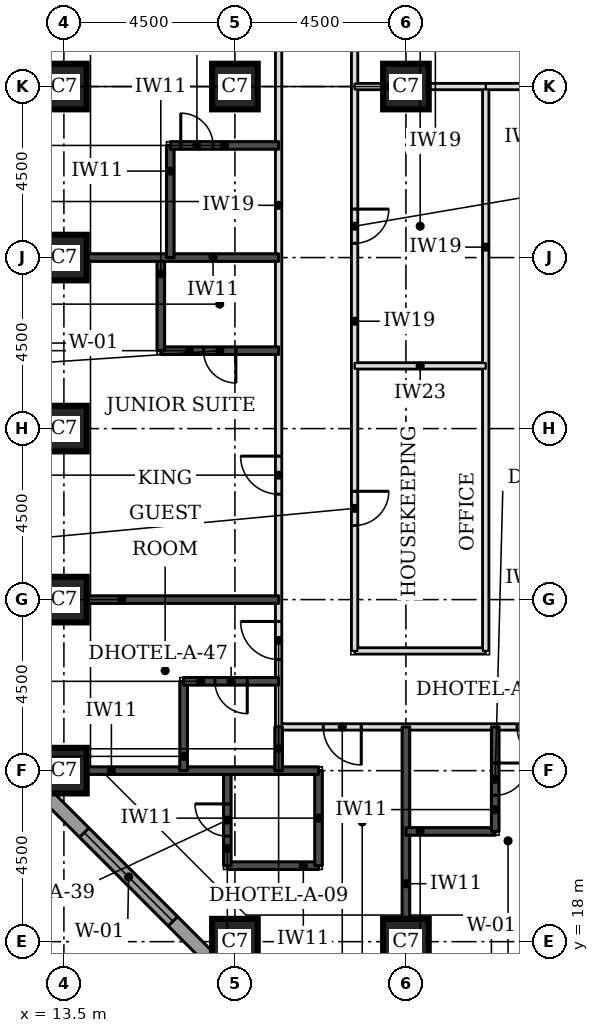
"""IFC4 building model, lengths in metres.
Left out: names, types, materials, properties, quantities, classifications, styles, units other than length and angle.
Written with IfcOpenShell. Run it as: python <this file> out.ifc"""

import sys

from ifc_helpers import new_model, si_unit, direction, frame, frame_2d, origin, origin_2d, place, context, subcontext, project, spatial, rectangle, extrude, element, fill, save


model = new_model("IFC4")
c1 = context("Model", 3, precision=1e-05, world=origin(), true_north=direction((0.0, 1.0)))
c2 = subcontext(c1, "Body", "Model", "MODEL_VIEW")
j1 = project(units=[si_unit("LENGTHUNIT", "METRE"), si_unit("PLANEANGLEUNIT", "RADIAN")], contexts=[c1])
p1 = place(None, origin())
s1 = spatial("IfcSite", under=j1, at=p1, CompositionType="ELEMENT")
p2 = place(p1, origin())
s2 = spatial("IfcBuilding", under=s1, at=p2, CompositionType="ELEMENT")
p3 = place(p2, frame((0.0, 0.0, 26.4)))
s3 = spatial("IfcBuildingStorey", under=s2, at=p3, CompositionType="ELEMENT", Elevation=26.4)
for number, where, z_axis, x_axis in (
    (1, (18.0, 18.0, 0.0), (0.0, 0.0, 1.0), (1.0, 0.0, 0.0)),
    (2, (22.5, 18.0, 0.0), (0.0, 0.0, 1.0), (1.0, 0.0, 0.0)),
    (3, (13.5, 22.5, 0.0), (0.0, 0.0, 1.0), (1.0, 0.0, 0.0)),
    (4, (13.5, 27.0, 0.0), (0.0, 0.0, 1.0), (1.0, 0.0, 0.0)),
    (5, (13.5, 31.5, 0.0), (0.0, 0.0, 1.0), (1.0, 0.0, 0.0)),
    (6, (13.5, 36.0, 0.0), (0.0, 0.0, 1.0), (1.0, 0.0, 0.0)),
    (7, (13.5, 40.5, 0.0), (0.0, 0.0, 1.0), (1.0, 0.0, 0.0)),
    (8, (18.0, 40.5, 0.0), (0.0, 0.0, 1.0), (1.0, 0.0, 0.0)),
    (9, (22.5, 40.5, 0.0), (0.0, 0.0, 1.0), (1.0, 0.0, 0.0)),
):
    element("IfcColumn", number, at=place(p3, frame(where, z_axis=z_axis, x_axis=x_axis)), inside=s3, PredefinedType="COLUMN", context=c2, shape_type="SweptSolid", body=[
        extrude(rectangle(XDim=1.2, YDim=1.2, at=origin_2d()), origin(), (0.0, 0.0, 1.0), 3.3),
    ])
p4 = place(p3, frame((12.674, 22.23, 0.0), z_axis=(0.0, 0.0, 1.0), x_axis=(0.707106781187, -0.707106781187, 0.0)))
e10 = element("IfcWall", 10, at=p4, inside=s3, PredefinedType="STANDARD", context=c2, shape_type="SweptSolid", body=[
    extrude(rectangle(XDim=7.151, YDim=0.35, at=frame_2d((3.576, 0.0))), origin(), (0.0, 0.0, 1.0), 3.055),
])
p5 = place(p4, frame((1.926, 0.0, 0.8)))
e11 = element("IfcOpeningElement", 11, at=p5, cuts=e10, PredefinedType="OPENING", context=c2, shape_type="SweptSolid", body=[
    extrude(rectangle(XDim=3.3, YDim=1.5, at=frame_2d((1.65, 0.75))), frame((0.0, 0.185, 0.0), z_axis=(0.0, -1.0, 0.0), x_axis=(1.0, 0.0, 0.0)), (0.0, 0.0, 1.0), 0.37),
])
p6 = place(p3, frame((19.15, 23.65, 0.0), z_axis=(0.0, 0.0, 1.0), x_axis=(1.0, 0.0, 0.0)))
e12 = element("IfcWall", 12, at=p6, inside=s3, PredefinedType="PARTITIONING", context=c2, shape_type="SweptSolid", body=[
    extrude(rectangle(XDim=32.35, YDim=0.15, at=frame_2d((16.175, 0.0))), origin(), (0.0, 0.0, 1.0), 3.08),
])
p7 = place(p6, frame((6.275, 0.0, 0.0)))
e13 = element("IfcOpeningElement", 13, at=p7, cuts=e12, PredefinedType="OPENING", context=c2, shape_type="SweptSolid", body=[
    extrude(rectangle(XDim=1.0, YDim=2.1, at=frame_2d((0.5, 1.05))), frame((0.0, 0.085, 0.0), z_axis=(0.0, -1.0, 0.0), x_axis=(1.0, 0.0, 0.0)), (0.0, 0.0, 1.0), 0.17),
])
p8 = place(p6, frame((8.675, 0.0, 0.0)))
e14 = element("IfcOpeningElement", 14, at=p8, cuts=e12, PredefinedType="OPENING", context=c2, shape_type="SweptSolid", body=[
    extrude(rectangle(XDim=1.0, YDim=2.1, at=frame_2d((0.5, 1.05))), frame((0.0, 0.085, 0.0), z_axis=(0.0, -1.0, 0.0), x_axis=(1.0, 0.0, 0.0)), (0.0, 0.0, 1.0), 0.17),
])
p9 = place(p6, frame((15.25, 0.0, 0.0)))
e15 = element("IfcOpeningElement", 15, at=p9, cuts=e12, PredefinedType="OPENING", context=c2, shape_type="SweptSolid", body=[
    extrude(rectangle(XDim=1.0, YDim=2.1, at=frame_2d((0.5, 1.05))), frame((0.0, 0.085, 0.0), z_axis=(0.0, -1.0, 0.0), x_axis=(1.0, 0.0, 0.0)), (0.0, 0.0, 1.0), 0.17),
])
p10 = place(p6, frame((17.675, 0.0, 0.0)))
e16 = element("IfcOpeningElement", 16, at=p10, cuts=e12, PredefinedType="OPENING", context=c2, shape_type="SweptSolid", body=[
    extrude(rectangle(XDim=1.0, YDim=2.1, at=frame_2d((0.5, 1.05))), frame((0.0, 0.085, 0.0), z_axis=(0.0, -1.0, 0.0), x_axis=(1.0, 0.0, 0.0)), (0.0, 0.0, 1.0), 0.17),
])
p11 = place(p6, frame((24.275, 0.0, 0.0)))
e17 = element("IfcOpeningElement", 17, at=p11, cuts=e12, PredefinedType="OPENING", context=c2, shape_type="SweptSolid", body=[
    extrude(rectangle(XDim=1.0, YDim=2.1, at=frame_2d((0.5, 1.05))), frame((0.0, 0.085, 0.0), z_axis=(0.0, -1.0, 0.0), x_axis=(1.0, 0.0, 0.0)), (0.0, 0.0, 1.0), 0.17),
])
p12 = place(p6, frame((26.675, 0.0, 0.0)))
e18 = element("IfcOpeningElement", 18, at=p12, cuts=e12, PredefinedType="OPENING", context=c2, shape_type="SweptSolid", body=[
    extrude(rectangle(XDim=1.0, YDim=2.1, at=frame_2d((0.5, 1.05))), frame((0.0, 0.085, 0.0), z_axis=(0.0, -1.0, 0.0), x_axis=(1.0, 0.0, 0.0)), (0.0, 0.0, 1.0), 0.17),
])
p13 = place(p6, frame((1.175, 0.0, 0.0)))
e19 = element("IfcOpeningElement", 19, at=p13, cuts=e12, PredefinedType="OPENING", context=c2, shape_type="SweptSolid", body=[
    extrude(rectangle(XDim=1.0, YDim=2.1, at=frame_2d((0.5, 1.05))), frame((0.0, 0.085, 0.0), z_axis=(0.0, -1.0, 0.0), x_axis=(1.0, 0.0, 0.0)), (0.0, 0.0, 1.0), 0.17),
])
p14 = place(p6, frame((30.85, 0.0, 0.0)))
e20 = element("IfcOpeningElement", 20, at=p14, cuts=e12, PredefinedType="OPENING", context=c2, shape_type="SweptSolid", body=[
    extrude(rectangle(XDim=1.0, YDim=2.1, at=frame_2d((0.5, 1.05))), frame((0.0, 0.085, 0.0), z_axis=(0.0, -1.0, 0.0), x_axis=(1.0, 0.0, 0.0)), (0.0, 0.0, 1.0), 0.17),
])
p15 = place(p3, frame((19.15, 23.65, 0.0), z_axis=(0.0, 0.0, 1.0), x_axis=(0.0, 1.0, 0.0)))
e21 = element("IfcWall", 21, at=p15, inside=s3, PredefinedType="PARTITIONING", context=c2, shape_type="SweptSolid", body=[
    extrude(rectangle(XDim=25.85, YDim=0.15, at=frame_2d((12.925, 0.0))), origin(), (0.0, 0.0, 1.0), 3.08),
])
p16 = place(p15, frame((1.775, 0.0, 0.0)))
e22 = element("IfcOpeningElement", 22, at=p16, cuts=e21, PredefinedType="OPENING", context=c2, shape_type="SweptSolid", body=[
    extrude(rectangle(XDim=1.0, YDim=2.1, at=frame_2d((0.5, 1.05))), frame((0.0, 0.085, 0.0), z_axis=(0.0, -1.0, 0.0), x_axis=(1.0, 0.0, 0.0)), (0.0, 0.0, 1.0), 0.17),
])
p17 = place(p15, frame((6.125, 0.0, 0.0)))
e23 = element("IfcOpeningElement", 23, at=p17, cuts=e21, PredefinedType="OPENING", context=c2, shape_type="SweptSolid", body=[
    extrude(rectangle(XDim=1.0, YDim=2.1, at=frame_2d((0.5, 1.05))), frame((0.0, 0.085, 0.0), z_axis=(0.0, -1.0, 0.0), x_axis=(1.0, 0.0, 0.0)), (0.0, 0.0, 1.0), 0.17),
])
p18 = place(p15, frame((17.825, 0.0, 0.0)))
e24 = element("IfcOpeningElement", 24, at=p18, cuts=e21, PredefinedType="OPENING", context=c2, shape_type="SweptSolid", body=[
    extrude(rectangle(XDim=1.0, YDim=2.1, at=frame_2d((0.5, 1.05))), frame((0.0, 0.085, 0.0), z_axis=(0.0, -1.0, 0.0), x_axis=(1.0, 0.0, 0.0)), (0.0, 0.0, 1.0), 0.17),
])
p19 = place(p15, frame((23.04, 0.0, 0.0)))
e25 = element("IfcOpeningElement", 25, at=p19, cuts=e21, PredefinedType="OPENING", context=c2, shape_type="SweptSolid", body=[
    extrude(rectangle(XDim=0.9, YDim=2.1, at=frame_2d((0.45, 1.05))), frame((0.0, 0.085, 0.0), z_axis=(0.0, -1.0, 0.0), x_axis=(1.0, 0.0, 0.0)), (0.0, 0.0, 1.0), 0.17),
])
p20 = place(p3, frame((21.15, 25.65, 0.0), z_axis=(0.0, 0.0, 1.0), x_axis=(1.0, 0.0, 0.0)))
e26 = element("IfcWall", 26, at=p20, inside=s3, PredefinedType="PARTITIONING", context=c2, shape_type="SweptSolid", body=[
    extrude(rectangle(XDim=3.45, YDim=0.15, at=frame_2d((1.725, 0.0))), origin(), (0.0, 0.0, 1.0), 3.08),
])
p21 = place(p3, frame((21.15, 25.65, 0.0), z_axis=(0.0, 0.0, 1.0), x_axis=(0.0, 1.0, 0.0)))
e27 = element("IfcWall", 27, at=p21, inside=s3, PredefinedType="PARTITIONING", context=c2, shape_type="SweptSolid", body=[
    extrude(rectangle(XDim=17.35, YDim=0.15, at=frame_2d((8.675, 0.0))), origin(), (0.0, 0.0, 1.0), 3.08),
])
p22 = place(p21, frame((3.3, 0.0, 0.0)))
e28 = element("IfcOpeningElement", 28, at=p22, cuts=e27, PredefinedType="OPENING", context=c2, shape_type="SweptSolid", body=[
    extrude(rectangle(XDim=0.9, YDim=2.1, at=frame_2d((0.45, 1.05))), frame((0.0, 0.085, 0.0), z_axis=(0.0, -1.0, 0.0), x_axis=(1.0, 0.0, 0.0)), (0.0, 0.0, 1.0), 0.17),
])
p23 = place(p21, frame((10.725, 0.0, 0.0)))
e29 = element("IfcOpeningElement", 29, at=p23, cuts=e27, PredefinedType="OPENING", context=c2, shape_type="SweptSolid", body=[
    extrude(rectangle(XDim=0.9, YDim=2.1, at=frame_2d((0.45, 1.05))), frame((0.0, 0.085, 0.0), z_axis=(0.0, -1.0, 0.0), x_axis=(1.0, 0.0, 0.0)), (0.0, 0.0, 1.0), 0.17),
])
p24 = place(p3, frame((24.6, 25.65, 0.0), z_axis=(0.0, 0.0, 1.0), x_axis=(0.0, 1.0, 0.0)))
e30 = element("IfcWall", 30, at=p24, inside=s3, PredefinedType="PARTITIONING", context=c2, shape_type="SweptSolid", body=[
    extrude(rectangle(XDim=14.85, YDim=0.15, at=frame_2d((7.425, 0.0))), origin(), (0.0, 0.0, 1.0), 3.08),
])
p25 = place(p3, frame((24.6, 40.5, 0.0), z_axis=(0.0, 0.0, 1.0), x_axis=(1.0, 0.0, 0.0)))
e31 = element("IfcWall", 31, at=p25, inside=s3, PredefinedType="PARTITIONING", context=c2, shape_type="SweptSolid", body=[
    extrude(rectangle(XDim=2.35, YDim=0.15, at=frame_2d((1.175, 0.0))), origin(), (0.0, 0.0, 1.0), 2.33),
])
p26 = place(p3, frame((22.5, 18.6, 0.0), z_axis=(0.0, 0.0, 1.0), x_axis=(0.0, 1.0, 0.0)))
e32 = element("IfcWall", 32, at=p26, inside=s3, PredefinedType="SOLIDWALL", context=c2, shape_type="SweptSolid", body=[
    extrude(rectangle(XDim=5.05, YDim=0.2, at=frame_2d((2.525, 0.0))), origin(), (0.0, 0.0, 1.0), 3.08),
])
p27 = place(p3, frame((17.8, 20.0, 0.0), z_axis=(0.0, 0.0, 1.0), x_axis=(1.0, 0.0, 0.0)))
e33 = element("IfcWall", 33, at=p27, inside=s3, PredefinedType="SOLIDWALL", context=c2, shape_type="SweptSolid", body=[
    extrude(rectangle(XDim=2.4, YDim=0.2, at=frame_2d((1.2, 0.0))), origin(), (0.0, 0.0, 1.0), 3.08),
])
p28 = place(p3, frame((17.8, 20.0, 0.0), z_axis=(0.0, 0.0, 1.0), x_axis=(0.0, 1.0, 0.0)))
e34 = element("IfcWall", 34, at=p28, inside=s3, PredefinedType="SOLIDWALL", context=c2, shape_type="SweptSolid", body=[
    extrude(rectangle(XDim=2.5, YDim=0.2, at=frame_2d((1.25, 0.0))), origin(), (0.0, 0.0, 1.0), 3.08),
])
p29 = place(p28, frame((0.775, 0.0, 0.0)))
e35 = element("IfcOpeningElement", 35, at=p29, cuts=e34, PredefinedType="OPENING", context=c2, shape_type="SweptSolid", body=[
    extrude(rectangle(XDim=0.85, YDim=2.1, at=frame_2d((0.425, 1.05))), frame((0.0, 0.11, 0.0), z_axis=(0.0, -1.0, 0.0), x_axis=(1.0, 0.0, 0.0)), (0.0, 0.0, 1.0), 0.22),
])
p30 = place(p3, frame((20.2, 20.0, 0.0), z_axis=(0.0, 0.0, 1.0), x_axis=(0.0, 1.0, 0.0)))
e36 = element("IfcWall", 36, at=p30, inside=s3, PredefinedType="SOLIDWALL", context=c2, shape_type="SweptSolid", body=[
    extrude(rectangle(XDim=2.5, YDim=0.2, at=frame_2d((1.25, 0.0))), origin(), (0.0, 0.0, 1.0), 3.08),
])
p31 = place(p3, frame((22.5, 20.9, 0.0), z_axis=(0.0, 0.0, 1.0), x_axis=(1.0, 0.0, 0.0)))
e37 = element("IfcWall", 37, at=p31, inside=s3, PredefinedType="SOLIDWALL", context=c2, shape_type="SweptSolid", body=[
    extrude(rectangle(XDim=2.35, YDim=0.2, at=frame_2d((1.175, 0.0))), origin(), (0.0, 0.0, 1.0), 3.08),
])
p32 = place(p3, frame((24.85, 20.9, 0.0), z_axis=(0.0, 0.0, 1.0), x_axis=(0.0, 1.0, 0.0)))
e38 = element("IfcWall", 38, at=p32, inside=s3, PredefinedType="SOLIDWALL", context=c2, shape_type="SweptSolid", body=[
    extrude(rectangle(XDim=2.75, YDim=0.2, at=frame_2d((1.375, 0.0))), origin(), (0.0, 0.0, 1.0), 3.08),
])
p33 = place(p32, frame((0.95, 0.0, 0.0)))
e39 = element("IfcOpeningElement", 39, at=p33, cuts=e38, PredefinedType="OPENING", context=c2, shape_type="SweptSolid", body=[
    extrude(rectangle(XDim=0.85, YDim=2.1, at=frame_2d((0.425, 1.05))), frame((0.0, 0.11, 0.0), z_axis=(0.0, -1.0, 0.0), x_axis=(1.0, 0.0, 0.0)), (0.0, 0.0, 1.0), 0.22),
])
p34 = place(p3, frame((14.1, 22.5, 0.0), z_axis=(0.0, 0.0, 1.0), x_axis=(1.0, 0.0, 0.0)))
e40 = element("IfcWall", 40, at=p34, inside=s3, PredefinedType="SOLIDWALL", context=c2, shape_type="SweptSolid", body=[
    extrude(rectangle(XDim=6.1, YDim=0.2, at=frame_2d((3.05, 0.0))), origin(), (0.0, 0.0, 1.0), 3.08),
])
p35 = place(p3, frame((16.65, 22.5, 0.0), z_axis=(0.0, 0.0, 1.0), x_axis=(0.0, 1.0, 0.0)))
e41 = element("IfcWall", 41, at=p35, inside=s3, PredefinedType="SOLIDWALL", context=c2, shape_type="SweptSolid", body=[
    extrude(rectangle(XDim=2.35, YDim=0.2, at=frame_2d((1.175, 0.0))), origin(), (0.0, 0.0, 1.0), 3.08),
])
p36 = place(p3, frame((19.15, 22.5, 0.0), z_axis=(0.0, 0.0, 1.0), x_axis=(0.0, 1.0, 0.0)))
e42 = element("IfcWall", 42, at=p36, inside=s3, PredefinedType="SOLIDWALL", context=c2, shape_type="SweptSolid", body=[
    extrude(rectangle(XDim=1.15, YDim=0.2, at=frame_2d((0.575, 0.0))), origin(), (0.0, 0.0, 1.0), 3.08),
])
p37 = place(p3, frame((16.65, 24.85, 0.0), z_axis=(0.0, 0.0, 1.0), x_axis=(1.0, 0.0, 0.0)))
e43 = element("IfcWall", 43, at=p37, inside=s3, PredefinedType="SOLIDWALL", context=c2, shape_type="SweptSolid", body=[
    extrude(rectangle(XDim=2.5, YDim=0.2, at=frame_2d((1.25, 0.0))), origin(), (0.0, 0.0, 1.0), 3.08),
])
p38 = place(p37, frame((0.825, 0.0, 0.0)))
e44 = element("IfcOpeningElement", 44, at=p38, cuts=e43, PredefinedType="OPENING", context=c2, shape_type="SweptSolid", body=[
    extrude(rectangle(XDim=0.85, YDim=2.1, at=frame_2d((0.425, 1.05))), frame((0.0, 0.11, 0.0), z_axis=(0.0, -1.0, 0.0), x_axis=(1.0, 0.0, 0.0)), (0.0, 0.0, 1.0), 0.22),
])
p39 = place(p3, frame((14.1, 27.0, 0.0), z_axis=(0.0, 0.0, 1.0), x_axis=(1.0, 0.0, 0.0)))
e45 = element("IfcWall", 45, at=p39, inside=s3, PredefinedType="SOLIDWALL", context=c2, shape_type="SweptSolid", body=[
    extrude(rectangle(XDim=5.05, YDim=0.2, at=frame_2d((2.525, 0.0))), origin(), (0.0, 0.0, 1.0), 3.08),
])
p40 = place(p3, frame((16.05, 33.55, 0.0), z_axis=(0.0, 0.0, 1.0), x_axis=(1.0, 0.0, 0.0)))
e46 = element("IfcWall", 46, at=p40, inside=s3, PredefinedType="SOLIDWALL", context=c2, shape_type="SweptSolid", body=[
    extrude(rectangle(XDim=3.1, YDim=0.2, at=frame_2d((1.55, 0.0))), origin(), (0.0, 0.0, 1.0), 3.08),
])
p41 = place(p40, frame((1.125, 0.0, 0.0)))
e47 = element("IfcOpeningElement", 47, at=p41, cuts=e46, PredefinedType="OPENING", context=c2, shape_type="SweptSolid", body=[
    extrude(rectangle(XDim=0.85, YDim=2.1, at=frame_2d((0.425, 1.05))), frame((0.0, 0.11, 0.0), z_axis=(0.0, -1.0, 0.0), x_axis=(1.0, 0.0, 0.0)), (0.0, 0.0, 1.0), 0.22),
])
p42 = place(p3, frame((16.05, 33.55, 0.0), z_axis=(0.0, 0.0, 1.0), x_axis=(0.0, 1.0, 0.0)))
e48 = element("IfcWall", 48, at=p42, inside=s3, PredefinedType="SOLIDWALL", context=c2, shape_type="SweptSolid", body=[
    extrude(rectangle(XDim=2.45, YDim=0.2, at=frame_2d((1.225, 0.0))), origin(), (0.0, 0.0, 1.0), 3.08),
])
p43 = place(p3, frame((14.1, 36.0, 0.0), z_axis=(0.0, 0.0, 1.0), x_axis=(1.0, 0.0, 0.0)))
e49 = element("IfcWall", 49, at=p43, inside=s3, PredefinedType="SOLIDWALL", context=c2, shape_type="SweptSolid", body=[
    extrude(rectangle(XDim=5.05, YDim=0.2, at=frame_2d((2.525, 0.0))), origin(), (0.0, 0.0, 1.0), 3.08),
])
p44 = place(p3, frame((16.3, 36.0, 0.0), z_axis=(0.0, 0.0, 1.0), x_axis=(0.0, 1.0, 0.0)))
e50 = element("IfcWall", 50, at=p44, inside=s3, PredefinedType="SOLIDWALL", context=c2, shape_type="SweptSolid", body=[
    extrude(rectangle(XDim=2.95, YDim=0.2, at=frame_2d((1.475, 0.0))), origin(), (0.0, 0.0, 1.0), 3.08),
])
p45 = place(p3, frame((16.3, 38.95, 0.0), z_axis=(0.0, 0.0, 1.0), x_axis=(1.0, 0.0, 0.0)))
e51 = element("IfcWall", 51, at=p45, inside=s3, PredefinedType="SOLIDWALL", context=c2, shape_type="SweptSolid", body=[
    extrude(rectangle(XDim=2.85, YDim=0.2, at=frame_2d((1.425, 0.0))), origin(), (0.0, 0.0, 1.0), 3.08),
])
p46 = place(p45, frame((0.275, 0.0, 0.0)))
e52 = element("IfcOpeningElement", 52, at=p46, cuts=e51, PredefinedType="OPENING", context=c2, shape_type="SweptSolid", body=[
    extrude(rectangle(XDim=0.85, YDim=2.1, at=frame_2d((0.425, 1.05))), frame((0.0, 0.11, 0.0), z_axis=(0.0, -1.0, 0.0), x_axis=(1.0, 0.0, 0.0)), (0.0, 0.0, 1.0), 0.22),
])
p47 = place(p3, frame((21.15, 33.15, 0.0), z_axis=(0.0, 0.0, 1.0), x_axis=(1.0, 0.0, 0.0)))
e53 = element("IfcWall", 53, at=p47, inside=s3, PredefinedType="PARTITIONING", context=c2, shape_type="SweptSolid", body=[
    extrude(rectangle(XDim=3.45, YDim=0.15, at=frame_2d((1.725, 0.0))), origin(), (0.0, 0.0, 1.0), 3.08),
])
p48 = place(p3, frame((21.15, 40.5, 0.0), z_axis=(0.0, 0.0, 1.0), x_axis=(1.0, 0.0, 0.0)))
e54 = element("IfcWall", 54, at=p48, inside=s3, PredefinedType="PARTITIONING", context=c2, shape_type="SweptSolid", body=[
    extrude(rectangle(XDim=3.45, YDim=0.15, at=frame_2d((1.725, 0.0))), origin(), (0.0, 0.0, 1.0), 2.33),
])
p49 = place(p5, origin())
e55 = element("IfcWindow", 55, at=p49, inside=s3, PartitioningType="SINGLE_PANEL", PredefinedType="WINDOW", context=c2, shape_type="SweptSolid", body=[
    extrude(rectangle(XDim=3.3, YDim=1.5, at=frame_2d((1.65, 0.75))), frame((0.0, 0.085, 0.0), z_axis=(0.0, -1.0, 0.0), x_axis=(1.0, 0.0, 0.0)), (0.0, 0.0, 1.0), 0.06),
])
fill(e11, e55)
p50 = place(p7, frame((1.0, 0.0, 0.0), z_axis=(0.0, 0.0, 1.0), x_axis=(-1.0, 0.0, 0.0)))
e56 = element("IfcDoor", 56, at=p50, inside=s3, OperationType="SINGLE_SWING_LEFT", PredefinedType="DOOR", context=c2, shape_type="SweptSolid", body=[
    extrude(rectangle(XDim=1.0, YDim=2.1, at=frame_2d((0.5, 1.05))), frame((0.0, 0.025, 0.0), z_axis=(0.0, -1.0, 0.0), x_axis=(1.0, 0.0, 0.0)), (0.0, 0.0, 1.0), 0.05),
])
fill(e13, e56)
p51 = place(p33, frame((0.85, 0.0, 0.0), z_axis=(0.0, 0.0, 1.0), x_axis=(-1.0, 0.0, 0.0)))
e57 = element("IfcDoor", 57, at=p51, inside=s3, OperationType="SINGLE_SWING_LEFT", PredefinedType="DOOR", context=c2, shape_type="SweptSolid", body=[
    extrude(rectangle(XDim=0.85, YDim=2.1, at=frame_2d((0.425, 1.05))), frame((0.0, 0.025, 0.0), z_axis=(0.0, -1.0, 0.0), x_axis=(1.0, 0.0, 0.0)), (0.0, 0.0, 1.0), 0.05),
])
fill(e39, e57)
p52 = place(p16, origin())
e58 = element("IfcDoor", 58, at=p52, inside=s3, OperationType="SINGLE_SWING_RIGHT", PredefinedType="DOOR", context=c2, shape_type="SweptSolid", body=[
    extrude(rectangle(XDim=1.0, YDim=2.1, at=frame_2d((0.5, 1.05))), frame((0.0, 0.025, 0.0), z_axis=(0.0, -1.0, 0.0), x_axis=(1.0, 0.0, 0.0)), (0.0, 0.0, 1.0), 0.05),
])
fill(e22, e58)
p53 = place(p38, frame((0.85, 0.0, 0.0), z_axis=(0.0, 0.0, 1.0), x_axis=(-1.0, 0.0, 0.0)))
e59 = element("IfcDoor", 59, at=p53, inside=s3, OperationType="SINGLE_SWING_LEFT", PredefinedType="DOOR", context=c2, shape_type="SweptSolid", body=[
    extrude(rectangle(XDim=0.85, YDim=2.1, at=frame_2d((0.425, 1.05))), frame((0.0, 0.025, 0.0), z_axis=(0.0, -1.0, 0.0), x_axis=(1.0, 0.0, 0.0)), (0.0, 0.0, 1.0), 0.05),
])
fill(e44, e59)
p54 = place(p17, origin())
e60 = element("IfcDoor", 60, at=p54, inside=s3, OperationType="SINGLE_SWING_RIGHT", PredefinedType="DOOR", context=c2, shape_type="SweptSolid", body=[
    extrude(rectangle(XDim=1.0, YDim=2.1, at=frame_2d((0.5, 1.05))), frame((0.0, 0.025, 0.0), z_axis=(0.0, -1.0, 0.0), x_axis=(1.0, 0.0, 0.0)), (0.0, 0.0, 1.0), 0.05),
])
fill(e23, e60)
p55 = place(p41, frame((0.85, 0.0, 0.0), z_axis=(0.0, 0.0, 1.0), x_axis=(-1.0, 0.0, 0.0)))
e61 = element("IfcDoor", 61, at=p55, inside=s3, OperationType="SINGLE_SWING_LEFT", PredefinedType="DOOR", context=c2, shape_type="SweptSolid", body=[
    extrude(rectangle(XDim=0.85, YDim=2.1, at=frame_2d((0.425, 1.05))), frame((0.0, 0.025, 0.0), z_axis=(0.0, -1.0, 0.0), x_axis=(1.0, 0.0, 0.0)), (0.0, 0.0, 1.0), 0.05),
])
fill(e47, e61)
p56 = place(p46, origin())
e62 = element("IfcDoor", 62, at=p56, inside=s3, OperationType="SINGLE_SWING_LEFT", PredefinedType="DOOR", context=c2, shape_type="SweptSolid", body=[
    extrude(rectangle(XDim=0.85, YDim=2.1, at=frame_2d((0.425, 1.05))), frame((0.0, 0.025, 0.0), z_axis=(0.0, -1.0, 0.0), x_axis=(1.0, 0.0, 0.0)), (0.0, 0.0, 1.0), 0.05),
])
fill(e52, e62)
p57 = place(p13, frame((1.0, 0.0, 0.0), z_axis=(0.0, 0.0, 1.0), x_axis=(-1.0, 0.0, 0.0)))
e63 = element("IfcDoor", 63, at=p57, inside=s3, OperationType="SINGLE_SWING_LEFT", PredefinedType="DOOR", context=c2, shape_type="SweptSolid", body=[
    extrude(rectangle(XDim=1.0, YDim=2.1, at=frame_2d((0.5, 1.05))), frame((0.0, 0.025, 0.0), z_axis=(0.0, -1.0, 0.0), x_axis=(1.0, 0.0, 0.0)), (0.0, 0.0, 1.0), 0.05),
])
fill(e19, e63)
p58 = place(p29, origin())
e64 = element("IfcDoor", 64, at=p58, inside=s3, OperationType="SINGLE_SWING_RIGHT", PredefinedType="DOOR", context=c2, shape_type="SweptSolid", body=[
    extrude(rectangle(XDim=0.85, YDim=2.1, at=frame_2d((0.425, 1.05))), frame((0.0, 0.025, 0.0), z_axis=(0.0, -1.0, 0.0), x_axis=(1.0, 0.0, 0.0)), (0.0, 0.0, 1.0), 0.05),
])
fill(e35, e64)
p59 = place(p22, frame((0.9, 0.0, 0.0), z_axis=(0.0, 0.0, 1.0), x_axis=(-1.0, 0.0, 0.0)))
e65 = element("IfcDoor", 65, at=p59, inside=s3, OperationType="SINGLE_SWING_LEFT", PredefinedType="DOOR", context=c2, shape_type="SweptSolid", body=[
    extrude(rectangle(XDim=0.9, YDim=2.1, at=frame_2d((0.45, 1.05))), frame((0.0, 0.025, 0.0), z_axis=(0.0, -1.0, 0.0), x_axis=(1.0, 0.0, 0.0)), (0.0, 0.0, 1.0), 0.05),
])
fill(e28, e65)
p60 = place(p23, frame((0.9, 0.0, 0.0), z_axis=(0.0, 0.0, 1.0), x_axis=(-1.0, 0.0, 0.0)))
e66 = element("IfcDoor", 66, at=p60, inside=s3, OperationType="SINGLE_SWING_LEFT", PredefinedType="DOOR", context=c2, shape_type="SweptSolid", body=[
    extrude(rectangle(XDim=0.9, YDim=2.1, at=frame_2d((0.45, 1.05))), frame((0.0, 0.025, 0.0), z_axis=(0.0, -1.0, 0.0), x_axis=(1.0, 0.0, 0.0)), (0.0, 0.0, 1.0), 0.05),
])
fill(e29, e66)
save(model, sys.argv[1])
